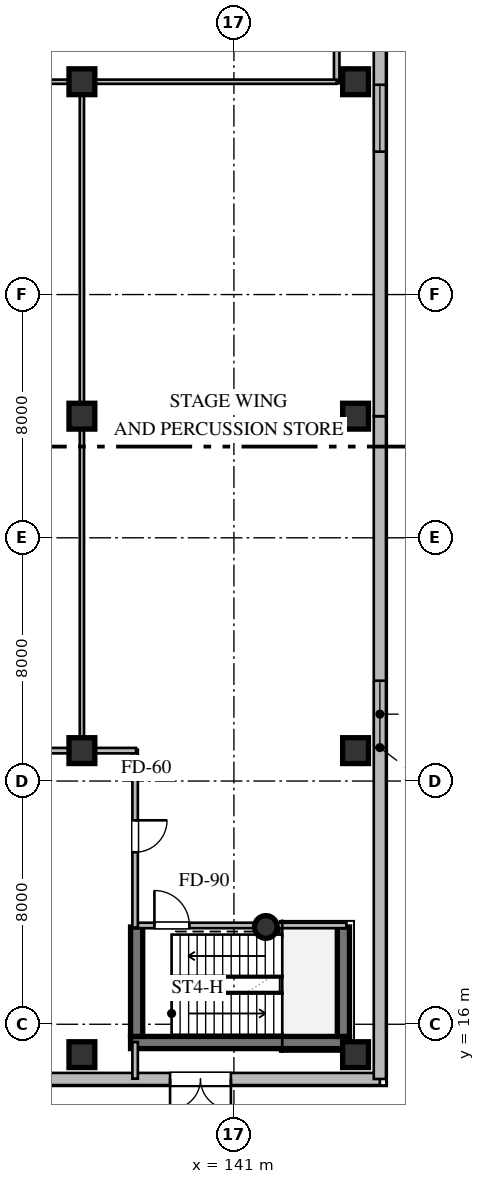
"""IFC4 building model, lengths in metres.
Left out: names, types, materials, properties, quantities, classifications, styles, units other than length and angle.
Written with IfcOpenShell. Run it as: python <this file> out.ifc"""

import sys

from ifc_helpers import new_model, si_unit, direction, frame, frame_2d, origin, origin_2d, place, context, subcontext, project, spatial, rectangle, circle, extrude, element, fill, save


model = new_model("IFC4")
c1 = context("Model", 3, precision=1e-05, world=origin(), true_north=direction((0.0, 1.0)))
c2 = subcontext(c1, "Body", "Model", "MODEL_VIEW")
j1 = project(units=[si_unit("LENGTHUNIT", "METRE"), si_unit("PLANEANGLEUNIT", "RADIAN")], contexts=[c1])
p1 = place(None, origin())
s1 = spatial("IfcSite", under=j1, at=p1, CompositionType="ELEMENT")
p2 = place(p1, origin())
s2 = spatial("IfcBuilding", under=s1, at=p2, CompositionType="ELEMENT")
p3 = place(p2, origin())
s3 = spatial("IfcBuildingStorey", under=s2, at=p3, CompositionType="ELEMENT", Elevation=0.0)
for number, where, z_axis, x_axis in (
    (1, (136.0, 15.0, 0.0), (0.0, 0.0, 1.0), (1.0, 0.0, 0.0)),
    (2, (136.0, 25.0, 0.0), (0.0, 0.0, 1.0), (1.0, 0.0, 0.0)),
    (3, (136.0, 36.0, 0.0), (0.0, 0.0, 1.0), (1.0, 0.0, 0.0)),
    (4, (136.0, 47.0, 0.0), (0.0, 0.0, 1.0), (1.0, 0.0, 0.0)),
    (5, (145.0, 15.0, 0.0), (0.0, 0.0, 1.0), (1.0, 0.0, 0.0)),
    (6, (145.0, 25.0, 0.0), (0.0, 0.0, 1.0), (1.0, 0.0, 0.0)),
    (7, (145.0, 36.0, 0.0), (0.0, 0.0, 1.0), (1.0, 0.0, 0.0)),
    (8, (145.0, 47.0, 0.0), (0.0, 0.0, 1.0), (1.0, 0.0, 0.0)),
):
    element("IfcColumn", number, at=place(p3, frame(where, z_axis=z_axis, x_axis=x_axis)), inside=s3, PredefinedType="COLUMN", context=c2, shape_type="SweptSolid", body=[
        extrude(rectangle(XDim=0.85, YDim=0.85, at=origin_2d()), origin(), (0.0, 0.0, 1.0), 4.8),
    ])
p4 = place(p3, frame((137.6, 15.4, 0.0), z_axis=(0.0, 0.0, 1.0), x_axis=(1.0, 0.0, 0.0)))
e9 = element("IfcWall", 9, at=p4, inside=s3, PredefinedType="SHEAR", context=c2, shape_type="SweptSolid", body=[
    extrude(rectangle(XDim=7.2, YDim=0.4, at=frame_2d((3.6, 0.0))), origin(), (0.0, 0.0, 1.0), 4.52),
])
for number, where, z_axis, x_axis in (
    (10, (137.8, 15.6, 0.0), (0.0, 0.0, 1.0), (0.0, 1.0, 0.0)),
    (11, (144.6, 15.6, 0.0), (0.0, 0.0, 1.0), (0.0, 1.0, 0.0)),
):
    element("IfcWall", number, at=place(p3, frame(where, z_axis=z_axis, x_axis=x_axis)), inside=s3, PredefinedType="SHEAR", context=c2, shape_type="SweptSolid", body=[
        extrude(rectangle(XDim=3.6, YDim=0.4, at=frame_2d((1.8, 0.0))), origin(), (0.0, 0.0, 1.0), 4.52),
    ])
p5 = place(p3, frame((142.05, 19.2, 0.0), z_axis=(0.0, 0.0, 1.0), x_axis=(1.0, 0.0, 0.0)))
e12 = element("IfcColumn", 12, at=p5, inside=s3, PredefinedType="COLUMN", context=c2, shape_type="SweptSolid", body=[
    extrude(circle(Radius=0.375, at=origin_2d()), origin(), (0.0, 0.0, 1.0), 4.8),
])
p6 = place(p3, frame((145.8, 14.2, 0.0), z_axis=(0.0, 0.0, 1.0), x_axis=(-1.0, 0.0, 0.0)))
e13 = element("IfcWall", 13, at=p6, inside=s3, PredefinedType="STANDARD", context=c2, shape_type="SweptSolid", body=[
    extrude(rectangle(XDim=11.8, YDim=0.4, at=frame_2d((5.9, 0.0))), origin(), (0.0, 0.0, 1.0), 4.52),
])
p7 = place(p6, frame((4.9, 0.0, 0.0)))
e14 = element("IfcOpeningElement", 14, at=p7, cuts=e13, PredefinedType="OPENING", context=c2, shape_type="SweptSolid", body=[
    extrude(rectangle(XDim=2.0, YDim=2.2, at=frame_2d((1.0, 1.1))), frame((0.0, 0.21, 0.0), z_axis=(0.0, -1.0, 0.0), x_axis=(1.0, 0.0, 0.0)), (0.0, 0.0, 1.0), 0.42),
])
p8 = place(p3, frame((145.8, 14.2, 0.0), z_axis=(0.0, 0.0, 1.0), x_axis=(0.0, 1.0, 0.0)))
e15 = element("IfcWall", 15, at=p8, inside=s3, PredefinedType="STANDARD", context=c2, shape_type="SweptSolid", body=[
    extrude(rectangle(XDim=21.8, YDim=0.4, at=frame_2d((10.9, 0.0))), origin(), (0.0, 0.0, 1.0), 4.52),
])
p9 = place(p8, frame((10.9, 0.0, 1.25)))
e16 = element("IfcOpeningElement", 16, at=p9, cuts=e15, PredefinedType="OPENING", context=c2, shape_type="SweptSolid", body=[
    extrude(rectangle(XDim=2.2, YDim=1.5, at=frame_2d((1.1, 0.75))), frame((0.0, 0.21, 0.0), z_axis=(0.0, -1.0, 0.0), x_axis=(1.0, 0.0, 0.0)), (0.0, 0.0, 1.0), 0.42),
])
p10 = place(p3, frame((145.8, 36.0, 0.0), z_axis=(0.0, 0.0, 1.0), x_axis=(0.0, 1.0, 0.0)))
e17 = element("IfcWall", 17, at=p10, inside=s3, PredefinedType="STANDARD", context=c2, shape_type="SweptSolid", body=[
    extrude(rectangle(XDim=21.8, YDim=0.4, at=frame_2d((10.9, 0.0))), origin(), (0.0, 0.0, 1.0), 4.52),
])
p11 = place(p10, frame((8.7, 0.0, 1.25)))
e18 = element("IfcOpeningElement", 18, at=p11, cuts=e17, PredefinedType="OPENING", context=c2, shape_type="SweptSolid", body=[
    extrude(rectangle(XDim=2.2, YDim=1.5, at=frame_2d((1.1, 0.75))), frame((0.0, 0.21, 0.0), z_axis=(0.0, -1.0, 0.0), x_axis=(1.0, 0.0, 0.0)), (0.0, 0.0, 1.0), 0.42),
])
p12 = place(p3, frame((137.7, 19.25, 0.0), z_axis=(0.0, 0.0, 1.0), x_axis=(1.0, 0.0, 0.0)))
e19 = element("IfcWall", 19, at=p12, inside=s3, PredefinedType="PARTITIONING", context=c2, shape_type="SweptSolid", body=[
    extrude(rectangle(XDim=7.0, YDim=0.18, at=frame_2d((3.5, 0.0))), origin(), (0.0, 0.0, 1.0), 4.52),
])
p13 = place(p12, frame((0.685, 0.0, 0.0)))
e20 = element("IfcOpeningElement", 20, at=p13, cuts=e19, PredefinedType="OPENING", context=c2, shape_type="SweptSolid", body=[
    extrude(rectangle(XDim=1.15, YDim=2.1, at=frame_2d((0.575, 1.05))), frame((0.0, 0.1, 0.0), z_axis=(0.0, -1.0, 0.0), x_axis=(1.0, 0.0, 0.0)), (0.0, 0.0, 1.0), 0.2),
])
p14 = place(p3, frame((144.38, 46.95, 0.0), z_axis=(0.0, 0.0, 1.0), x_axis=(0.0, 1.0, 0.0)))
e21 = element("IfcWall", 21, at=p14, inside=s3, PredefinedType="PARTITIONING", context=c2, shape_type="SweptSolid", body=[
    extrude(rectangle(XDim=10.9, YDim=0.18, at=frame_2d((5.45, 0.0))), origin(), (0.0, 0.0, 1.0), 4.093),
])
p15 = place(p3, frame((103.97, 25.0, 0.0), z_axis=(0.0, 0.0, 1.0), x_axis=(1.0, 0.0, 0.0)))
e22 = element("IfcWall", 22, at=p15, inside=s3, PredefinedType="PARTITIONING", context=c2, shape_type="SweptSolid", body=[
    extrude(rectangle(XDim=32.095, YDim=0.18, at=frame_2d((16.047, 0.0))), origin(), (0.0, 0.0, 1.0), 3.899),
])
p16 = place(p15, frame((17.897, 0.0, 0.0)))
e23 = element("IfcOpeningElement", 23, at=p16, cuts=e22, PredefinedType="OPENING", context=c2, shape_type="SweptSolid", body=[
    extrude(rectangle(XDim=1.5, YDim=2.15, at=frame_2d((0.75, 1.075))), frame((0.0, 0.1, 0.0), z_axis=(0.0, -1.0, 0.0), x_axis=(1.0, 0.0, 0.0)), (0.0, 0.0, 1.0), 0.2),
])
p17 = place(p3, frame((137.75, 25.03, 0.0), z_axis=(0.0, 0.0, 1.0), x_axis=(0.0, -1.0, 0.0)))
e24 = element("IfcWall", 24, at=p17, inside=s3, PredefinedType="PARTITIONING", context=c2, shape_type="SweptSolid", body=[
    extrude(rectangle(XDim=5.845, YDim=0.18, at=frame_2d((2.922, 0.0))), origin(), (0.0, 0.0, 1.0), 4.52),
])
p18 = place(p17, frame((2.322, 0.0, 0.0)))
e25 = element("IfcOpeningElement", 25, at=p18, cuts=e24, PredefinedType="OPENING", context=c2, shape_type="SweptSolid", body=[
    extrude(rectangle(XDim=1.05, YDim=2.1, at=frame_2d((0.525, 1.05))), frame((0.0, 0.1, 0.0), z_axis=(0.0, -1.0, 0.0), x_axis=(1.0, 0.0, 0.0)), (0.0, 0.0, 1.0), 0.2),
])
p19 = place(p3, frame((135.935, 25.0, 0.0), z_axis=(0.0, 0.0, 1.0), x_axis=(1.0, 0.0, 0.0)))
e26 = element("IfcWall", 26, at=p19, inside=s3, PredefinedType="PARTITIONING", context=c2, shape_type="SweptSolid", body=[
    extrude(rectangle(XDim=1.845, YDim=0.18, at=frame_2d((0.922, 0.0))), origin(), (0.0, 0.0, 1.0), 3.899),
])
p20 = place(p3, frame((137.75, 15.415, 0.0), z_axis=(0.0, 0.0, 1.0), x_axis=(0.0, -1.0, 0.0)))
e27 = element("IfcWall", 27, at=p20, inside=s3, PredefinedType="PARTITIONING", context=c2, shape_type="SweptSolid", body=[
    extrude(rectangle(XDim=1.205, YDim=0.18, at=frame_2d((0.603, 0.0))), origin(), (0.0, 0.0, 1.0), 4.52),
])
p21 = place(p3, frame((129.435, 47.0, 0.0), z_axis=(0.0, 0.0, 1.0), x_axis=(1.0, 0.0, 0.0)))
e28 = element("IfcWall", 28, at=p21, inside=s3, PredefinedType="PARTITIONING", context=c2, shape_type="SweptSolid", body=[
    extrude(rectangle(XDim=6.595, YDim=0.14, at=frame_2d((3.297, 0.0))), origin(), (0.0, 0.0, 1.0), 3.899),
])
p22 = place(p3, frame((136.0, 47.03, 0.0), z_axis=(0.0, 0.0, 1.0), x_axis=(0.0, -1.0, 0.0)))
e29 = element("IfcWall", 29, at=p22, inside=s3, PredefinedType="PARTITIONING", context=c2, shape_type="SweptSolid", body=[
    extrude(rectangle(XDim=22.06, YDim=0.14, at=frame_2d((11.03, 0.0))), origin(), (0.0, 0.0, 1.0), 4.093),
])
p23 = place(p3, frame((144.38, 47.0, 0.0), z_axis=(0.0, 0.0, 1.0), x_axis=(-1.0, 0.0, 0.0)))
e30 = element("IfcWall", 30, at=p23, inside=s3, PredefinedType="PARTITIONING", context=c2, shape_type="SweptSolid", body=[
    extrude(rectangle(XDim=8.445, YDim=0.14, at=frame_2d((4.222, 0.0))), origin(), (0.0, 0.0, 1.0), 3.899),
])
p24 = place(p7, origin())
e31 = element("IfcDoor", 31, at=p24, inside=s3, OperationType="DOUBLE_DOOR_SINGLE_SWING", PredefinedType="DOOR", context=c2, shape_type="SweptSolid", body=[
    extrude(rectangle(XDim=2.0, YDim=2.2, at=frame_2d((1.0, 1.1))), frame((0.0, 0.025, 0.0), z_axis=(0.0, -1.0, 0.0), x_axis=(1.0, 0.0, 0.0)), (0.0, 0.0, 1.0), 0.05),
])
fill(e14, e31)
p25 = place(p9, origin())
e32 = element("IfcWindow", 32, at=p25, inside=s3, PartitioningType="SINGLE_PANEL", PredefinedType="WINDOW", context=c2, shape_type="SweptSolid", body=[
    extrude(rectangle(XDim=2.2, YDim=1.5, at=frame_2d((1.1, 0.75))), frame((0.0, 0.03, 0.0), z_axis=(0.0, -1.0, 0.0), x_axis=(1.0, 0.0, 0.0)), (0.0, 0.0, 1.0), 0.06),
])
fill(e16, e32)
p26 = place(p11, origin())
e33 = element("IfcWindow", 33, at=p26, inside=s3, PartitioningType="SINGLE_PANEL", PredefinedType="WINDOW", context=c2, shape_type="SweptSolid", body=[
    extrude(rectangle(XDim=2.2, YDim=1.5, at=frame_2d((1.1, 0.75))), frame((0.0, 0.03, 0.0), z_axis=(0.0, -1.0, 0.0), x_axis=(1.0, 0.0, 0.0)), (0.0, 0.0, 1.0), 0.06),
])
fill(e18, e33)
p27 = place(p13, origin())
e34 = element("IfcDoor", 34, at=p27, inside=s3, OperationType="SINGLE_SWING_LEFT", PredefinedType="DOOR", context=c2, shape_type="SweptSolid", body=[
    extrude(rectangle(XDim=1.15, YDim=2.1, at=frame_2d((0.575, 1.05))), frame((0.0, 0.025, 0.0), z_axis=(0.0, -1.0, 0.0), x_axis=(1.0, 0.0, 0.0)), (0.0, 0.0, 1.0), 0.05),
])
fill(e20, e34)
p28 = place(p18, origin())
e35 = element("IfcDoor", 35, at=p28, inside=s3, OperationType="SINGLE_SWING_LEFT", PredefinedType="DOOR", context=c2, shape_type="SweptSolid", body=[
    extrude(rectangle(XDim=1.05, YDim=2.1, at=frame_2d((0.525, 1.05))), frame((0.0, 0.025, 0.0), z_axis=(0.0, -1.0, 0.0), x_axis=(1.0, 0.0, 0.0)), (0.0, 0.0, 1.0), 0.05),
])
fill(e25, e35)
save(model, sys.argv[1])
